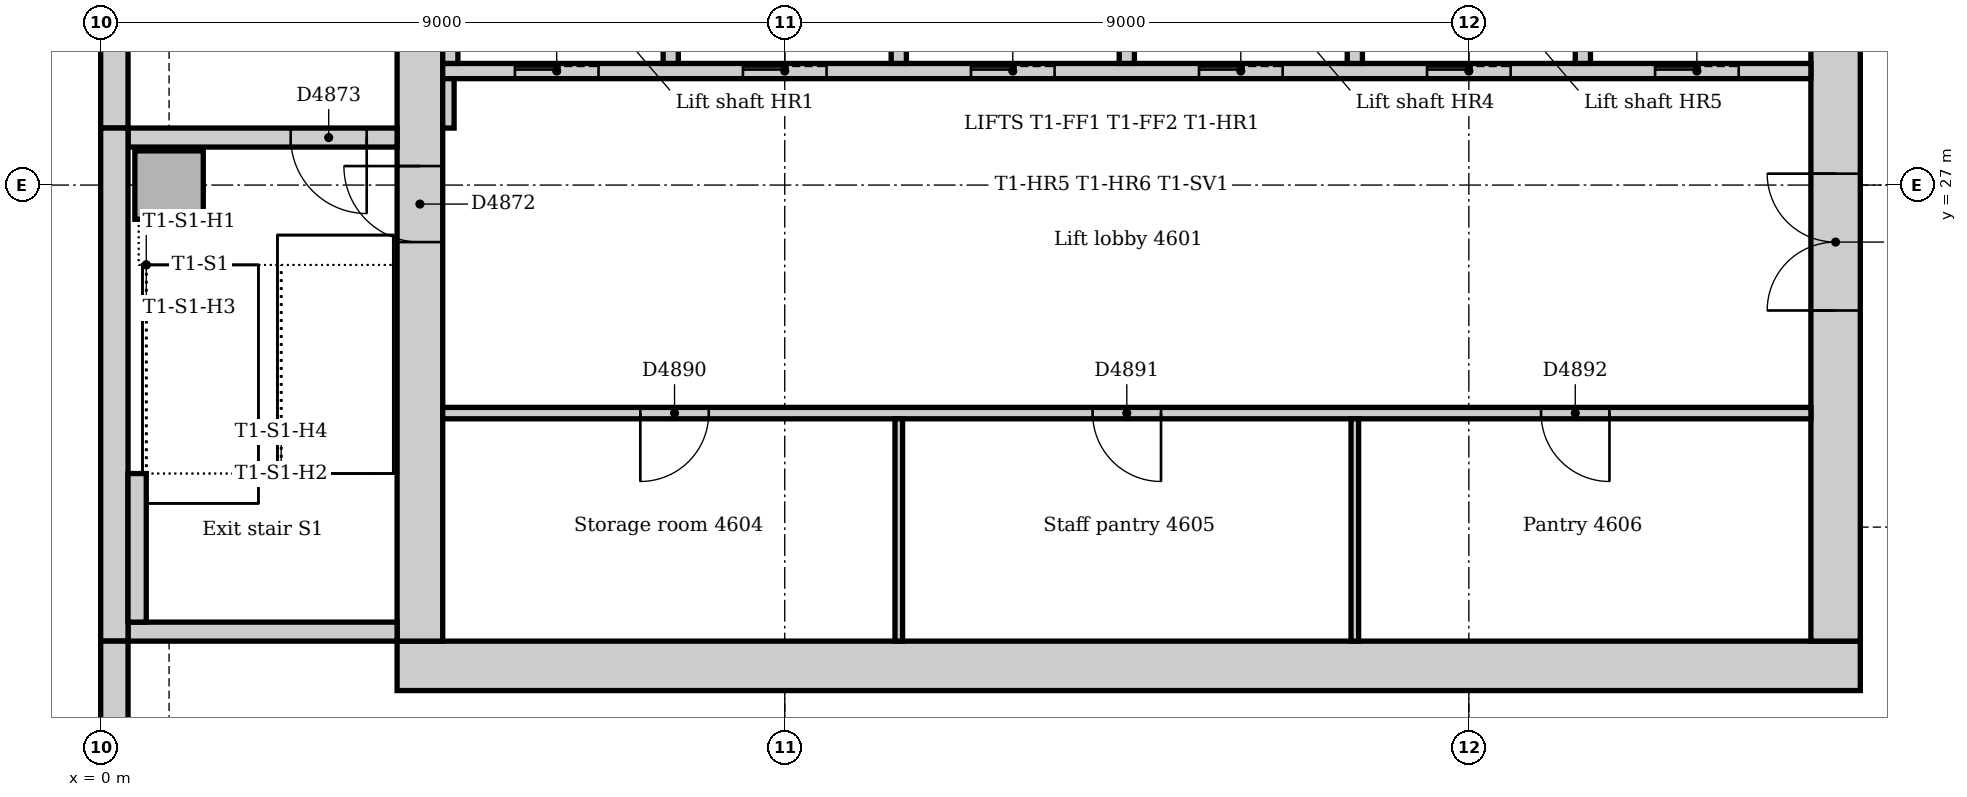
"""IFC4 building model, lengths in metres.
Left out: names, types, materials, properties, quantities, classifications, styles, units other than length and angle.
Written with IfcOpenShell. Run it as: python <this file> out.ifc"""

import sys

from ifc_helpers import new_model, si_unit, direction, frame, frame_2d, origin, origin_2d, place, context, subcontext, project, spatial, rectangle, extrude, element, fill, save


model = new_model("IFC4")
c1 = context("Model", 3, precision=1e-05, world=origin(), true_north=direction((0.0, 1.0)))
c2 = subcontext(c1, "Body", "Model", "MODEL_VIEW")
j1 = project(units=[si_unit("LENGTHUNIT", "METRE"), si_unit("PLANEANGLEUNIT", "RADIAN")], contexts=[c1])
p1 = place(None, origin())
s1 = spatial("IfcSite", under=j1, at=p1, CompositionType="ELEMENT")
p2 = place(p1, origin())
s2 = spatial("IfcBuilding", under=s1, at=p2, CompositionType="ELEMENT")
p3 = place(p2, frame((0.0, 0.0, 193.0)))
s3 = spatial("IfcBuildingStorey", under=s2, at=p3, CompositionType="ELEMENT", Elevation=193.0)
p4 = place(p3, frame((3.9, 20.675, 0.0), z_axis=(0.0, 0.0, 1.0), x_axis=(1.0, 0.0, 0.0)))
e1 = element("IfcWall", 1, at=p4, inside=s3, PredefinedType="SOLIDWALL", context=c2, shape_type="SweptSolid", body=[
    extrude(rectangle(XDim=19.25, YDim=0.65, at=frame_2d((9.625, 0.0))), origin(), (0.0, 0.0, 1.0), 5.0),
])
p5 = place(p3, frame((22.825, 21.0, 0.0), z_axis=(0.0, 0.0, 1.0), x_axis=(0.0, 1.0, 0.0)))
e2 = element("IfcWall", 2, at=p5, inside=s3, PredefinedType="SOLIDWALL", context=c2, shape_type="SweptSolid", body=[
    extrude(rectangle(XDim=10.5, YDim=0.65, at=frame_2d((5.25, 0.0))), origin(), (0.0, 0.0, 1.0), 5.0),
])
p6 = place(p5, frame((4.35, 0.0, 0.0)))
e3 = element("IfcOpeningElement", 3, at=p6, cuts=e2, PredefinedType="OPENING", context=c2, shape_type="SweptSolid", body=[
    extrude(rectangle(XDim=1.8, YDim=2.1, at=frame_2d((0.9, 1.05))), frame((0.0, 0.335, 0.0), z_axis=(0.0, -1.0, 0.0), x_axis=(1.0, 0.0, 0.0)), (0.0, 0.0, 1.0), 0.67),
])
p7 = place(p3, frame((4.2, 31.5, 0.0), z_axis=(0.0, 0.0, 1.0), x_axis=(0.0, -1.0, 0.0)))
e4 = element("IfcWall", 4, at=p7, inside=s3, PredefinedType="SOLIDWALL", context=c2, shape_type="SweptSolid", body=[
    extrude(rectangle(XDim=10.5, YDim=0.6, at=frame_2d((5.25, 0.0))), origin(), (0.0, 0.0, 1.0), 5.0),
])
p8 = place(p7, frame((4.25, 0.0, 0.0)))
e5 = element("IfcOpeningElement", 5, at=p8, cuts=e4, PredefinedType="OPENING", context=c2, shape_type="SweptSolid", body=[
    extrude(rectangle(XDim=1.0, YDim=2.1, at=frame_2d((0.5, 1.05))), frame((0.0, 0.31, 0.0), z_axis=(0.0, -1.0, 0.0), x_axis=(1.0, 0.0, 0.0)), (0.0, 0.0, 1.0), 0.62),
])
p9 = place(p3, frame((0.36, 21.125, 0.0), z_axis=(0.0, 0.0, 1.0), x_axis=(1.0, 0.0, 0.0)))
e6 = element("IfcWall", 6, at=p9, inside=s3, PredefinedType="SOLIDWALL", context=c2, shape_type="SweptSolid", body=[
    extrude(rectangle(XDim=3.54, YDim=0.25, at=frame_2d((1.77, 0.0))), origin(), (0.0, 0.0, 1.0), 5.0),
])
p10 = place(p3, frame((3.9, 27.625, 0.0), z_axis=(0.0, 0.0, 1.0), x_axis=(-1.0, 0.0, 0.0)))
e7 = element("IfcWall", 7, at=p10, inside=s3, PredefinedType="SOLIDWALL", context=c2, shape_type="SweptSolid", body=[
    extrude(rectangle(XDim=3.54, YDim=0.25, at=frame_2d((1.77, 0.0))), origin(), (0.0, 0.0, 1.0), 5.0),
])
p11 = place(p10, frame((0.4, 0.0, 0.0)))
e8 = element("IfcOpeningElement", 8, at=p11, cuts=e7, PredefinedType="OPENING", context=c2, shape_type="SweptSolid", body=[
    extrude(rectangle(XDim=1.0, YDim=2.1, at=frame_2d((0.5, 1.05))), frame((0.0, 0.135, 0.0), z_axis=(0.0, -1.0, 0.0), x_axis=(1.0, 0.0, 0.0)), (0.0, 0.0, 1.0), 0.27),
])
p12 = place(p3, frame((0.9, 27.0, 0.0), z_axis=(0.0, 0.0, 1.0), x_axis=(1.0, 0.0, 0.0)))
e9 = element("IfcColumn", 9, at=p12, inside=s3, PredefinedType="COLUMN", context=c2, shape_type="SweptSolid", body=[
    extrude(rectangle(XDim=0.9, YDim=0.9, at=origin_2d()), origin(), (0.0, 0.0, 1.0), 5.0),
])
p13 = place(p3, frame((0.18, 35.25, 0.0), z_axis=(0.0, 0.0, 1.0), x_axis=(0.0, -1.0, 0.0)))
e10 = element("IfcWall", 10, at=p13, inside=s3, PredefinedType="STANDARD", context=c2, shape_type="SweptSolid", body=[
    extrude(rectangle(XDim=7.5, YDim=0.36, at=frame_2d((3.75, 0.0))), origin(), (0.0, 0.0, 1.0), 4.85),
])
p14 = place(p3, frame((0.18, 27.75, 0.0), z_axis=(0.0, 0.0, 1.0), x_axis=(0.0, -1.0, 0.0)))
e11 = element("IfcWall", 11, at=p14, inside=s3, PredefinedType="STANDARD", context=c2, shape_type="SweptSolid", body=[
    extrude(rectangle(XDim=6.75, YDim=0.36, at=frame_2d((3.375, 0.0))), origin(), (0.0, 0.0, 1.0), 4.85),
])
p15 = place(p3, frame((0.18, 21.0, 0.0), z_axis=(0.0, 0.0, 1.0), x_axis=(0.0, -1.0, 0.0)))
e12 = element("IfcWall", 12, at=p15, inside=s3, PredefinedType="STANDARD", context=c2, shape_type="SweptSolid", body=[
    extrude(rectangle(XDim=7.757, YDim=0.36, at=frame_2d((3.879, 0.0))), origin(), (0.0, 0.0, 1.0), 4.85),
])
p16 = place(p15, frame((1.35, 0.0, 0.9)))
e13 = element("IfcOpeningElement", 13, at=p16, cuts=e12, PredefinedType="OPENING", context=c2, shape_type="SweptSolid", body=[
    extrude(rectangle(XDim=3.3, YDim=2.2, at=frame_2d((1.65, 1.1))), frame((0.0, 0.19, 0.0), z_axis=(0.0, -1.0, 0.0), x_axis=(1.0, 0.0, 0.0)), (0.0, 0.0, 1.0), 0.38),
])
p17 = place(p3, frame((0.48, 21.25, 0.0), z_axis=(0.0, 0.0, 1.0), x_axis=(0.0, 1.0, 0.0)))
e14 = element("IfcWall", 14, at=p17, inside=s3, PredefinedType="STANDARD", context=c2, shape_type="SweptSolid", body=[
    extrude(rectangle(XDim=1.955, YDim=0.24, at=frame_2d((0.978, 0.0))), origin(), (0.0, 0.0, 1.0), 5.0),
])
p18 = place(p3, frame((4.5, 28.5, 0.0), z_axis=(0.0, 0.0, 1.0), x_axis=(1.0, 0.0, 0.0)))
e15 = element("IfcWall", 15, at=p18, inside=s3, PredefinedType="PARTITIONING", context=c2, shape_type="SweptSolid", body=[
    extrude(rectangle(XDim=18.0, YDim=0.2, at=frame_2d((9.0, 0.0))), origin(), (0.0, 0.0, 1.0), 4.85),
])
p19 = place(p18, frame((0.95, 0.0, 0.0)))
e16 = element("IfcOpeningElement", 16, at=p19, cuts=e15, PredefinedType="OPENING", context=c2, shape_type="SweptSolid", body=[
    extrude(rectangle(XDim=1.1, YDim=2.1, at=frame_2d((0.55, 1.05))), frame((0.0, 0.11, 0.0), z_axis=(0.0, -1.0, 0.0), x_axis=(1.0, 0.0, 0.0)), (0.0, 0.0, 1.0), 0.22),
])
p20 = place(p18, frame((3.95, 0.0, 0.0)))
e17 = element("IfcOpeningElement", 17, at=p20, cuts=e15, PredefinedType="OPENING", context=c2, shape_type="SweptSolid", body=[
    extrude(rectangle(XDim=1.1, YDim=2.1, at=frame_2d((0.55, 1.05))), frame((0.0, 0.11, 0.0), z_axis=(0.0, -1.0, 0.0), x_axis=(1.0, 0.0, 0.0)), (0.0, 0.0, 1.0), 0.22),
])
p21 = place(p18, frame((6.95, 0.0, 0.0)))
e18 = element("IfcOpeningElement", 18, at=p21, cuts=e15, PredefinedType="OPENING", context=c2, shape_type="SweptSolid", body=[
    extrude(rectangle(XDim=1.1, YDim=2.1, at=frame_2d((0.55, 1.05))), frame((0.0, 0.11, 0.0), z_axis=(0.0, -1.0, 0.0), x_axis=(1.0, 0.0, 0.0)), (0.0, 0.0, 1.0), 0.22),
])
p22 = place(p18, frame((9.95, 0.0, 0.0)))
e19 = element("IfcOpeningElement", 19, at=p22, cuts=e15, PredefinedType="OPENING", context=c2, shape_type="SweptSolid", body=[
    extrude(rectangle(XDim=1.1, YDim=2.1, at=frame_2d((0.55, 1.05))), frame((0.0, 0.11, 0.0), z_axis=(0.0, -1.0, 0.0), x_axis=(1.0, 0.0, 0.0)), (0.0, 0.0, 1.0), 0.22),
])
p23 = place(p18, frame((12.95, 0.0, 0.0)))
e20 = element("IfcOpeningElement", 20, at=p23, cuts=e15, PredefinedType="OPENING", context=c2, shape_type="SweptSolid", body=[
    extrude(rectangle(XDim=1.1, YDim=2.1, at=frame_2d((0.55, 1.05))), frame((0.0, 0.11, 0.0), z_axis=(0.0, -1.0, 0.0), x_axis=(1.0, 0.0, 0.0)), (0.0, 0.0, 1.0), 0.22),
])
p24 = place(p18, frame((15.95, 0.0, 0.0)))
e21 = element("IfcOpeningElement", 21, at=p24, cuts=e15, PredefinedType="OPENING", context=c2, shape_type="SweptSolid", body=[
    extrude(rectangle(XDim=1.1, YDim=2.1, at=frame_2d((0.55, 1.05))), frame((0.0, 0.11, 0.0), z_axis=(0.0, -1.0, 0.0), x_axis=(1.0, 0.0, 0.0)), (0.0, 0.0, 1.0), 0.22),
])
for number, where, z_axis, x_axis in (
    (22, (10.5, 28.6, 0.0), (0.0, 0.0, 1.0), (0.0, 1.0, 0.0)),
    (23, (13.5, 28.6, 0.0), (0.0, 0.0, 1.0), (0.0, 1.0, 0.0)),
    (24, (16.5, 28.6, 0.0), (0.0, 0.0, 1.0), (0.0, 1.0, 0.0)),
    (25, (19.5, 28.6, 0.0), (0.0, 0.0, 1.0), (0.0, 1.0, 0.0)),
    (26, (4.6, 28.6, 0.0), (0.0, 0.0, 1.0), (0.0, 1.0, 0.0)),
    (27, (7.5, 28.6, 0.0), (0.0, 0.0, 1.0), (0.0, 1.0, 0.0)),
):
    element("IfcWall", number, at=place(p3, frame(where, z_axis=z_axis, x_axis=x_axis)), inside=s3, PredefinedType="PARTITIONING", context=c2, shape_type="SweptSolid", body=[
        extrude(rectangle(XDim=2.65, YDim=0.2, at=frame_2d((1.325, 0.0))), origin(), (0.0, 0.0, 1.0), 4.85),
    ])
p25 = place(p3, frame((4.5, 24.0, 0.0), z_axis=(0.0, 0.0, 1.0), x_axis=(1.0, 0.0, 0.0)))
e28 = element("IfcWall", 28, at=p25, inside=s3, PredefinedType="PARTITIONING", context=c2, shape_type="SweptSolid", body=[
    extrude(rectangle(XDim=18.0, YDim=0.15, at=frame_2d((9.0, 0.0))), origin(), (0.0, 0.0, 1.0), 4.85),
])
p26 = place(p25, frame((2.6, 0.0, 0.0)))
e29 = element("IfcOpeningElement", 29, at=p26, cuts=e28, PredefinedType="OPENING", context=c2, shape_type="SweptSolid", body=[
    extrude(rectangle(XDim=0.9, YDim=2.1, at=frame_2d((0.45, 1.05))), frame((0.0, 0.085, 0.0), z_axis=(0.0, -1.0, 0.0), x_axis=(1.0, 0.0, 0.0)), (0.0, 0.0, 1.0), 0.17),
])
p27 = place(p25, frame((8.55, 0.0, 0.0)))
e30 = element("IfcOpeningElement", 30, at=p27, cuts=e28, PredefinedType="OPENING", context=c2, shape_type="SweptSolid", body=[
    extrude(rectangle(XDim=0.9, YDim=2.1, at=frame_2d((0.45, 1.05))), frame((0.0, 0.085, 0.0), z_axis=(0.0, -1.0, 0.0), x_axis=(1.0, 0.0, 0.0)), (0.0, 0.0, 1.0), 0.17),
])
p28 = place(p25, frame((14.45, 0.0, 0.0)))
e31 = element("IfcOpeningElement", 31, at=p28, cuts=e28, PredefinedType="OPENING", context=c2, shape_type="SweptSolid", body=[
    extrude(rectangle(XDim=0.9, YDim=2.1, at=frame_2d((0.45, 1.05))), frame((0.0, 0.085, 0.0), z_axis=(0.0, -1.0, 0.0), x_axis=(1.0, 0.0, 0.0)), (0.0, 0.0, 1.0), 0.17),
])
p29 = place(p3, frame((4.575, 27.75, 0.0), z_axis=(0.0, 0.0, 1.0), x_axis=(0.0, 1.0, 0.0)))
e32 = element("IfcWall", 32, at=p29, inside=s3, PredefinedType="PARTITIONING", context=c2, shape_type="SweptSolid", body=[
    extrude(rectangle(XDim=0.65, YDim=0.15, at=frame_2d((0.325, 0.0))), origin(), (0.0, 0.0, 1.0), 4.85),
])
for number, where, z_axis, x_axis in (
    (33, (10.5, 21.0, 0.0), (0.0, 0.0, 1.0), (0.0, 1.0, 0.0)),
    (34, (16.5, 21.0, 0.0), (0.0, 0.0, 1.0), (0.0, 1.0, 0.0)),
):
    element("IfcWall", number, at=place(p3, frame(where, z_axis=z_axis, x_axis=x_axis)), inside=s3, PredefinedType="PARTITIONING", context=c2, shape_type="SweptSolid", body=[
        extrude(rectangle(XDim=2.925, YDim=0.1, at=frame_2d((1.462, 0.0))), origin(), (0.0, 0.0, 1.0), 4.85),
    ])
p30 = place(p8, frame((1.0, 0.0, 0.0), z_axis=(0.0, 0.0, 1.0), x_axis=(-1.0, 0.0, 0.0)))
e35 = element("IfcDoor", 35, at=p30, inside=s3, OperationType="SINGLE_SWING_RIGHT", PredefinedType="DOOR", context=c2, shape_type="SweptSolid", body=[
    extrude(rectangle(XDim=1.0, YDim=2.1, at=frame_2d((0.5, 1.05))), frame((0.0, 0.025, 0.0), z_axis=(0.0, -1.0, 0.0), x_axis=(1.0, 0.0, 0.0)), (0.0, 0.0, 1.0), 0.05),
])
fill(e5, e35)
p31 = place(p11, origin())
e36 = element("IfcDoor", 36, at=p31, inside=s3, OperationType="SINGLE_SWING_LEFT", PredefinedType="DOOR", context=c2, shape_type="SweptSolid", body=[
    extrude(rectangle(XDim=1.0, YDim=2.1, at=frame_2d((0.5, 1.05))), frame((0.0, 0.025, 0.0), z_axis=(0.0, -1.0, 0.0), x_axis=(1.0, 0.0, 0.0)), (0.0, 0.0, 1.0), 0.05),
])
fill(e8, e36)
p32 = place(p19, origin())
e37 = element("IfcDoor", 37, at=p32, inside=s3, OperationType="SLIDING_TO_LEFT", PredefinedType="DOOR", context=c2, shape_type="SweptSolid", body=[
    extrude(rectangle(XDim=1.1, YDim=2.1, at=frame_2d((0.55, 1.05))), frame((0.0, 0.025, 0.0), z_axis=(0.0, -1.0, 0.0), x_axis=(1.0, 0.0, 0.0)), (0.0, 0.0, 1.0), 0.05),
])
fill(e16, e37)
p33 = place(p20, origin())
e38 = element("IfcDoor", 38, at=p33, inside=s3, OperationType="SLIDING_TO_LEFT", PredefinedType="DOOR", context=c2, shape_type="SweptSolid", body=[
    extrude(rectangle(XDim=1.1, YDim=2.1, at=frame_2d((0.55, 1.05))), frame((0.0, 0.025, 0.0), z_axis=(0.0, -1.0, 0.0), x_axis=(1.0, 0.0, 0.0)), (0.0, 0.0, 1.0), 0.05),
])
fill(e17, e38)
p34 = place(p21, origin())
e39 = element("IfcDoor", 39, at=p34, inside=s3, OperationType="SLIDING_TO_LEFT", PredefinedType="DOOR", context=c2, shape_type="SweptSolid", body=[
    extrude(rectangle(XDim=1.1, YDim=2.1, at=frame_2d((0.55, 1.05))), frame((0.0, 0.025, 0.0), z_axis=(0.0, -1.0, 0.0), x_axis=(1.0, 0.0, 0.0)), (0.0, 0.0, 1.0), 0.05),
])
fill(e18, e39)
p35 = place(p22, origin())
e40 = element("IfcDoor", 40, at=p35, inside=s3, OperationType="SLIDING_TO_LEFT", PredefinedType="DOOR", context=c2, shape_type="SweptSolid", body=[
    extrude(rectangle(XDim=1.1, YDim=2.1, at=frame_2d((0.55, 1.05))), frame((0.0, 0.025, 0.0), z_axis=(0.0, -1.0, 0.0), x_axis=(1.0, 0.0, 0.0)), (0.0, 0.0, 1.0), 0.05),
])
fill(e19, e40)
p36 = place(p23, origin())
e41 = element("IfcDoor", 41, at=p36, inside=s3, OperationType="SLIDING_TO_LEFT", PredefinedType="DOOR", context=c2, shape_type="SweptSolid", body=[
    extrude(rectangle(XDim=1.1, YDim=2.1, at=frame_2d((0.55, 1.05))), frame((0.0, 0.025, 0.0), z_axis=(0.0, -1.0, 0.0), x_axis=(1.0, 0.0, 0.0)), (0.0, 0.0, 1.0), 0.05),
])
fill(e20, e41)
p37 = place(p24, origin())
e42 = element("IfcDoor", 42, at=p37, inside=s3, OperationType="SLIDING_TO_LEFT", PredefinedType="DOOR", context=c2, shape_type="SweptSolid", body=[
    extrude(rectangle(XDim=1.1, YDim=2.1, at=frame_2d((0.55, 1.05))), frame((0.0, 0.025, 0.0), z_axis=(0.0, -1.0, 0.0), x_axis=(1.0, 0.0, 0.0)), (0.0, 0.0, 1.0), 0.05),
])
fill(e21, e42)
p38 = place(p6, origin())
e43 = element("IfcDoor", 43, at=p38, inside=s3, OperationType="DOUBLE_DOOR_DOUBLE_SWING", PredefinedType="DOOR", context=c2, shape_type="SweptSolid", body=[
    extrude(rectangle(XDim=1.8, YDim=2.1, at=frame_2d((0.9, 1.05))), frame((0.0, 0.025, 0.0), z_axis=(0.0, -1.0, 0.0), x_axis=(1.0, 0.0, 0.0)), (0.0, 0.0, 1.0), 0.05),
])
fill(e3, e43)
p39 = place(p26, frame((0.9, 0.0, 0.0), z_axis=(0.0, 0.0, 1.0), x_axis=(-1.0, 0.0, 0.0)))
e44 = element("IfcDoor", 44, at=p39, inside=s3, OperationType="SINGLE_SWING_RIGHT", PredefinedType="DOOR", context=c2, shape_type="SweptSolid", body=[
    extrude(rectangle(XDim=0.9, YDim=2.1, at=frame_2d((0.45, 1.05))), frame((0.0, 0.025, 0.0), z_axis=(0.0, -1.0, 0.0), x_axis=(1.0, 0.0, 0.0)), (0.0, 0.0, 1.0), 0.05),
])
fill(e29, e44)
p40 = place(p27, frame((0.9, 0.0, 0.0), z_axis=(0.0, 0.0, 1.0), x_axis=(-1.0, 0.0, 0.0)))
e45 = element("IfcDoor", 45, at=p40, inside=s3, OperationType="SINGLE_SWING_LEFT", PredefinedType="DOOR", context=c2, shape_type="SweptSolid", body=[
    extrude(rectangle(XDim=0.9, YDim=2.1, at=frame_2d((0.45, 1.05))), frame((0.0, 0.025, 0.0), z_axis=(0.0, -1.0, 0.0), x_axis=(1.0, 0.0, 0.0)), (0.0, 0.0, 1.0), 0.05),
])
fill(e30, e45)
p41 = place(p28, frame((0.9, 0.0, 0.0), z_axis=(0.0, 0.0, 1.0), x_axis=(-1.0, 0.0, 0.0)))
e46 = element("IfcDoor", 46, at=p41, inside=s3, OperationType="SINGLE_SWING_LEFT", PredefinedType="DOOR", context=c2, shape_type="SweptSolid", body=[
    extrude(rectangle(XDim=0.9, YDim=2.1, at=frame_2d((0.45, 1.05))), frame((0.0, 0.025, 0.0), z_axis=(0.0, -1.0, 0.0), x_axis=(1.0, 0.0, 0.0)), (0.0, 0.0, 1.0), 0.05),
])
fill(e31, e46)
save(model, sys.argv[1])
